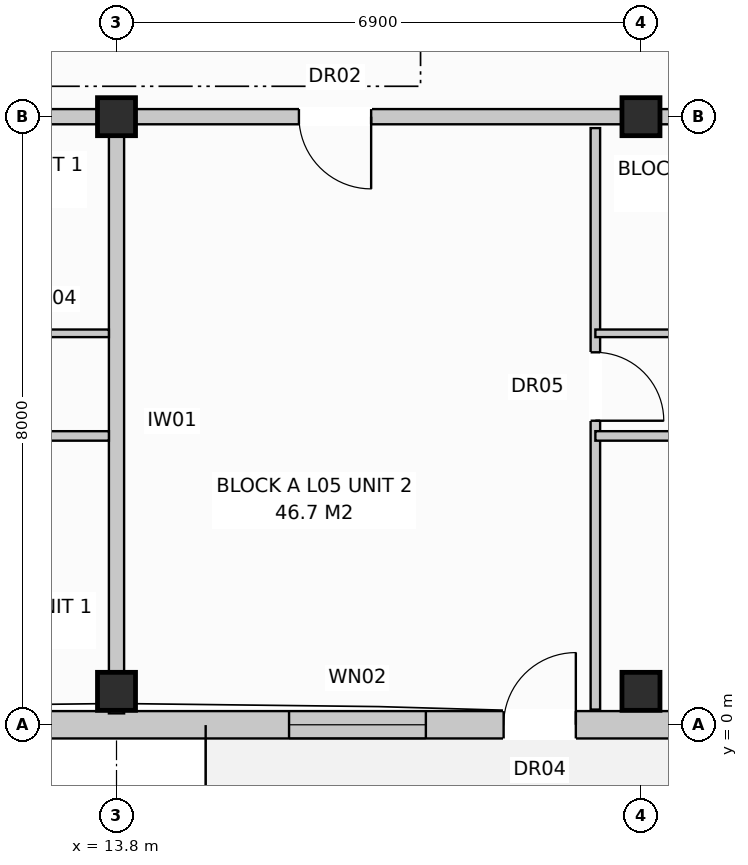
"""IFC4 building model, lengths in metres.
Left out: names, types, materials, properties, quantities, classifications, styles, units other than length and angle.
Written with IfcOpenShell. Run it as: python <this file> out.ifc"""

import sys

from ifc_helpers import new_model, si_unit, direction, frame, frame_2d, origin, origin_with_axes, origin_2d, place, context, subcontext, project, spatial, rectangle, extrude, element, fill, save


model = new_model("IFC4")
c1 = context("Model", 3, precision=1e-05, world=origin(), true_north=direction((0.0, 1.0)))
c2 = subcontext(c1, "Body", "Model", "MODEL_VIEW")
j1 = project(units=[si_unit("LENGTHUNIT", "METRE"), si_unit("PLANEANGLEUNIT", "RADIAN")], contexts=[c1])
p1 = place(None, origin())
s1 = spatial("IfcSite", under=j1, at=p1, CompositionType="ELEMENT")
p2 = place(p1, origin())
s2 = spatial("IfcBuilding", under=s1, at=p2, CompositionType="ELEMENT")
p3 = place(p2, frame((0.0, 0.0, 17.6)))
s3 = spatial("IfcBuildingStorey", under=s2, at=p3, CompositionType="ELEMENT", Elevation=17.6)
for number, where, z_axis, x_axis in (
    (1, (13.8, 0.44, 0.0), (0.0, 0.0, 1.0), (1.0, 0.0, 0.0)),
    (2, (13.8, 8.0, 0.0), (0.0, 0.0, 1.0), (1.0, 0.0, 0.0)),
    (3, (20.7, 0.44, 0.0), (0.0, 0.0, 1.0), (1.0, 0.0, 0.0)),
    (4, (20.7, 8.0, 0.0), (0.0, 0.0, 1.0), (1.0, 0.0, 0.0)),
):
    element("IfcColumn", number, at=place(p3, frame(where, z_axis=z_axis, x_axis=x_axis)), inside=s3, PredefinedType="COLUMN", context=c2, shape_type="SweptSolid", body=[
        extrude(rectangle(XDim=0.5, YDim=0.5, at=origin_2d()), origin(), (0.0, 0.0, 1.0), 3.2),
    ])
p4 = place(p3, frame((0.17, 0.0, 0.0), z_axis=(0.0, 0.0, 1.0), x_axis=(1.0, 0.0, 0.0)))
e5 = element("IfcWall", 5, at=p4, inside=s3, PredefinedType="STANDARD", context=c2, shape_type="SweptSolid", body=[
    extrude(rectangle(XDim=54.86, YDim=0.36, at=frame_2d((27.43, 0.0))), origin(), (0.0, 0.0, 1.0), 2.95),
])
p5 = place(p4, frame((3.823, 0.0, 0.0)))
e6 = element("IfcOpeningElement", 6, at=p5, cuts=e5, PredefinedType="OPENING", context=c2, shape_type="SweptSolid", body=[
    extrude(rectangle(XDim=0.95, YDim=2.1, at=frame_2d((0.475, 1.05))), frame((0.0, 0.192, 0.0), z_axis=(0.0, -1.0, 0.0), x_axis=(1.0, 0.0, 0.0)), (0.0, 0.0, 1.0), 0.384),
])
p6 = place(p4, frame((18.723, 0.0, 0.0)))
e7 = element("IfcOpeningElement", 7, at=p6, cuts=e5, PredefinedType="OPENING", context=c2, shape_type="SweptSolid", body=[
    extrude(rectangle(XDim=0.95, YDim=2.1, at=frame_2d((0.475, 1.05))), frame((0.0, 0.192, 0.0), z_axis=(0.0, -1.0, 0.0), x_axis=(1.0, 0.0, 0.0)), (0.0, 0.0, 1.0), 0.384),
])
p7 = place(p4, frame((29.123, 0.0, 0.0)))
e8 = element("IfcOpeningElement", 8, at=p7, cuts=e5, PredefinedType="OPENING", context=c2, shape_type="SweptSolid", body=[
    extrude(rectangle(XDim=0.95, YDim=2.1, at=frame_2d((0.475, 1.05))), frame((0.0, 0.192, 0.0), z_axis=(0.0, -1.0, 0.0), x_axis=(1.0, 0.0, 0.0)), (0.0, 0.0, 1.0), 0.384),
])
p8 = place(p4, frame((46.5, 0.0, 0.0)))
e9 = element("IfcOpeningElement", 9, at=p8, cuts=e5, PredefinedType="OPENING", context=c2, shape_type="SweptSolid", body=[
    extrude(rectangle(XDim=0.95, YDim=2.1, at=frame_2d((0.475, 1.05))), frame((0.0, 0.192, 0.0), z_axis=(0.0, -1.0, 0.0), x_axis=(1.0, 0.0, 0.0)), (0.0, 0.0, 1.0), 0.384),
])
p9 = place(p4, frame((1.6, 0.0, 0.8)))
e10 = element("IfcOpeningElement", 10, at=p9, cuts=e5, PredefinedType="OPENING", context=c2, shape_type="SweptSolid", body=[
    extrude(rectangle(XDim=1.8, YDim=1.7, at=frame_2d((0.9, 0.85))), frame((0.0, 0.192, 0.0), z_axis=(0.0, -1.0, 0.0), x_axis=(1.0, 0.0, 0.0)), (0.0, 0.0, 1.0), 0.384),
])
p10 = place(p4, frame((7.232, 0.0, 0.72)))
e11 = element("IfcOpeningElement", 11, at=p10, cuts=e5, PredefinedType="OPENING", context=c2, shape_type="SweptSolid", body=[
    extrude(rectangle(XDim=1.9, YDim=1.85, at=frame_2d((0.95, 0.925))), frame((0.0, 0.192, 0.0), z_axis=(0.0, -1.0, 0.0), x_axis=(1.0, 0.0, 0.0)), (0.0, 0.0, 1.0), 0.384),
])
p11 = place(p4, frame((10.425, 0.0, 0.8)))
e12 = element("IfcOpeningElement", 12, at=p11, cuts=e5, PredefinedType="OPENING", context=c2, shape_type="SweptSolid", body=[
    extrude(rectangle(XDim=1.95, YDim=1.65, at=frame_2d((0.975, 0.825))), frame((0.0, 0.192, 0.0), z_axis=(0.0, -1.0, 0.0), x_axis=(1.0, 0.0, 0.0)), (0.0, 0.0, 1.0), 0.384),
])
p12 = place(p4, frame((15.9, 0.0, 0.8)))
e13 = element("IfcOpeningElement", 13, at=p12, cuts=e5, PredefinedType="OPENING", context=c2, shape_type="SweptSolid", body=[
    extrude(rectangle(XDim=1.8, YDim=1.7, at=frame_2d((0.9, 0.85))), frame((0.0, 0.192, 0.0), z_axis=(0.0, -1.0, 0.0), x_axis=(1.0, 0.0, 0.0)), (0.0, 0.0, 1.0), 0.384),
])
p13 = place(p4, frame((21.55, 0.0, 0.72)))
e14 = element("IfcOpeningElement", 14, at=p13, cuts=e5, PredefinedType="OPENING", context=c2, shape_type="SweptSolid", body=[
    extrude(rectangle(XDim=1.9, YDim=1.85, at=frame_2d((0.95, 0.925))), frame((0.0, 0.192, 0.0), z_axis=(0.0, -1.0, 0.0), x_axis=(1.0, 0.0, 0.0)), (0.0, 0.0, 1.0), 0.384),
])
p14 = place(p4, frame((25.6, 0.0, 0.72)))
e15 = element("IfcOpeningElement", 15, at=p14, cuts=e5, PredefinedType="OPENING", context=c2, shape_type="SweptSolid", body=[
    extrude(rectangle(XDim=1.1, YDim=1.5, at=frame_2d((0.55, 0.75))), frame((0.0, 0.192, 0.0), z_axis=(0.0, -1.0, 0.0), x_axis=(1.0, 0.0, 0.0)), (0.0, 0.0, 1.0), 0.384),
])
p15 = place(p4, frame((31.4, 0.0, 0.8)))
e16 = element("IfcOpeningElement", 16, at=p15, cuts=e5, PredefinedType="OPENING", context=c2, shape_type="SweptSolid", body=[
    extrude(rectangle(XDim=1.8, YDim=1.7, at=frame_2d((0.9, 0.85))), frame((0.0, 0.192, 0.0), z_axis=(0.0, -1.0, 0.0), x_axis=(1.0, 0.0, 0.0)), (0.0, 0.0, 1.0), 0.384),
])
p16 = place(p4, frame((35.55, 0.0, 0.72)))
e17 = element("IfcOpeningElement", 17, at=p16, cuts=e5, PredefinedType="OPENING", context=c2, shape_type="SweptSolid", body=[
    extrude(rectangle(XDim=1.9, YDim=1.85, at=frame_2d((0.95, 0.925))), frame((0.0, 0.192, 0.0), z_axis=(0.0, -1.0, 0.0), x_axis=(1.0, 0.0, 0.0)), (0.0, 0.0, 1.0), 0.384),
])
p17 = place(p4, frame((39.25, 0.0, 0.72)))
e18 = element("IfcOpeningElement", 18, at=p17, cuts=e5, PredefinedType="OPENING", context=c2, shape_type="SweptSolid", body=[
    extrude(rectangle(XDim=1.1, YDim=1.5, at=frame_2d((0.55, 0.75))), frame((0.0, 0.192, 0.0), z_axis=(0.0, -1.0, 0.0), x_axis=(1.0, 0.0, 0.0)), (0.0, 0.0, 1.0), 0.384),
])
p18 = place(p4, frame((44.4, 0.0, 0.8)))
e19 = element("IfcOpeningElement", 19, at=p18, cuts=e5, PredefinedType="OPENING", context=c2, shape_type="SweptSolid", body=[
    extrude(rectangle(XDim=1.8, YDim=1.7, at=frame_2d((0.9, 0.85))), frame((0.0, 0.192, 0.0), z_axis=(0.0, -1.0, 0.0), x_axis=(1.0, 0.0, 0.0)), (0.0, 0.0, 1.0), 0.384),
])
p19 = place(p4, frame((49.15, 0.0, 0.72)))
e20 = element("IfcOpeningElement", 20, at=p19, cuts=e5, PredefinedType="OPENING", context=c2, shape_type="SweptSolid", body=[
    extrude(rectangle(XDim=1.9, YDim=1.85, at=frame_2d((0.95, 0.925))), frame((0.0, 0.192, 0.0), z_axis=(0.0, -1.0, 0.0), x_axis=(1.0, 0.0, 0.0)), (0.0, 0.0, 1.0), 0.384),
])
p20 = place(p4, frame((52.95, 0.0, 0.72)))
e21 = element("IfcOpeningElement", 21, at=p20, cuts=e5, PredefinedType="OPENING", context=c2, shape_type="SweptSolid", body=[
    extrude(rectangle(XDim=1.1, YDim=1.5, at=frame_2d((0.55, 0.75))), frame((0.0, 0.192, 0.0), z_axis=(0.0, -1.0, 0.0), x_axis=(1.0, 0.0, 0.0)), (0.0, 0.0, 1.0), 0.384),
])
p21 = place(p3, frame((13.8, 7.85, 0.0), z_axis=(0.0, 0.0, 1.0), x_axis=(0.0, -1.0, 0.0)))
e22 = element("IfcWall", 22, at=p21, inside=s3, PredefinedType="PARTITIONING", context=c2, shape_type="SweptSolid", body=[
    extrude(rectangle(XDim=7.7, YDim=0.2, at=frame_2d((3.85, 0.0))), origin(), (0.0, 0.0, 1.0), 2.95),
])
p22 = place(p3, frame((0.0, 8.0, 0.0), z_axis=(0.0, 0.0, 1.0), x_axis=(1.0, 0.0, 0.0)))
e23 = element("IfcWall", 23, at=p22, inside=s3, PredefinedType="PARTITIONING", context=c2, shape_type="SweptSolid", body=[
    extrude(rectangle(XDim=13.8, YDim=0.2, at=frame_2d((6.9, 0.0))), origin(), (0.0, 0.0, 1.0), 2.39),
])
p23 = place(p22, frame((2.4, 0.0, 0.0)))
e24 = element("IfcOpeningElement", 24, at=p23, cuts=e23, PredefinedType="OPENING", context=c2, shape_type="SweptSolid", body=[
    extrude(rectangle(XDim=0.95, YDim=2.15, at=frame_2d((0.475, 1.075))), frame((0.0, 0.112, 0.0), z_axis=(0.0, -1.0, 0.0), x_axis=(1.0, 0.0, 0.0)), (0.0, 0.0, 1.0), 0.224),
])
p24 = place(p3, frame((5.2, 5.15, 0.0), z_axis=(0.0, 0.0, 1.0), x_axis=(1.0, 0.0, 0.0)))
e25 = element("IfcWall", 25, at=p24, inside=s3, PredefinedType="PARTITIONING", context=c2, shape_type="SweptSolid", body=[
    extrude(rectangle(XDim=8.5, YDim=0.1, at=frame_2d((4.25, 0.0))), origin(), (0.0, 0.0, 1.0), 2.95),
])
p25 = place(p24, frame((1.0, 0.0, 0.0)))
e26 = element("IfcOpeningElement", 26, at=p25, cuts=e25, PredefinedType="OPENING", context=c2, shape_type="SweptSolid", body=[
    extrude(rectangle(XDim=0.85, YDim=2.1, at=frame_2d((0.425, 1.05))), frame((0.0, 0.062, 0.0), z_axis=(0.0, -1.0, 0.0), x_axis=(1.0, 0.0, 0.0)), (0.0, 0.0, 1.0), 0.124),
])
p26 = place(p24, frame((3.4, 0.0, 0.0)))
e27 = element("IfcOpeningElement", 27, at=p26, cuts=e25, PredefinedType="OPENING", context=c2, shape_type="SweptSolid", body=[
    extrude(rectangle(XDim=0.85, YDim=2.05, at=frame_2d((0.425, 1.025))), frame((0.0, 0.062, 0.0), z_axis=(0.0, -1.0, 0.0), x_axis=(1.0, 0.0, 0.0)), (0.0, 0.0, 1.0), 0.124),
])
p27 = place(p24, frame((6.2, 0.0, 0.0)))
e28 = element("IfcOpeningElement", 28, at=p27, cuts=e25, PredefinedType="OPENING", context=c2, shape_type="SweptSolid", body=[
    extrude(rectangle(XDim=0.85, YDim=2.05, at=frame_2d((0.425, 1.025))), frame((0.0, 0.062, 0.0), z_axis=(0.0, -1.0, 0.0), x_axis=(1.0, 0.0, 0.0)), (0.0, 0.0, 1.0), 0.124),
])
p28 = place(p3, frame((5.2, 3.8, 0.0), z_axis=(0.0, 0.0, 1.0), x_axis=(1.0, 0.0, 0.0)))
e29 = element("IfcWall", 29, at=p28, inside=s3, PredefinedType="PARTITIONING", context=c2, shape_type="SweptSolid", body=[
    extrude(rectangle(XDim=8.5, YDim=0.125, at=frame_2d((4.25, 0.0))), origin(), (0.0, 0.0, 1.0), 2.95),
])
p29 = place(p28, frame((1.5, 0.0, 0.0)))
e30 = element("IfcOpeningElement", 30, at=p29, cuts=e29, PredefinedType="OPENING", context=c2, shape_type="SweptSolid", body=[
    extrude(rectangle(XDim=0.9, YDim=2.1, at=frame_2d((0.45, 1.05))), frame((0.0, 0.074, 0.0), z_axis=(0.0, -1.0, 0.0), x_axis=(1.0, 0.0, 0.0)), (0.0, 0.0, 1.0), 0.149),
])
p30 = place(p28, frame((5.6, 0.0, 0.0)))
e31 = element("IfcOpeningElement", 31, at=p30, cuts=e29, PredefinedType="OPENING", context=c2, shape_type="SweptSolid", body=[
    extrude(rectangle(XDim=0.9, YDim=2.1, at=frame_2d((0.45, 1.05))), frame((0.0, 0.074, 0.0), z_axis=(0.0, -1.0, 0.0), x_axis=(1.0, 0.0, 0.0)), (0.0, 0.0, 1.0), 0.149),
])
p31 = place(p3, frame((13.8, 8.0, 0.0), z_axis=(0.0, 0.0, 1.0), x_axis=(1.0, 0.0, 0.0)))
e32 = element("IfcWall", 32, at=p31, inside=s3, PredefinedType="PARTITIONING", context=c2, shape_type="SweptSolid", body=[
    extrude(rectangle(XDim=20.7, YDim=0.2, at=frame_2d((10.35, 0.0))), origin(), (0.0, 0.0, 1.0), 2.39),
])
p32 = place(p31, frame((2.4, 0.0, 0.0)))
e33 = element("IfcOpeningElement", 33, at=p32, cuts=e32, PredefinedType="OPENING", context=c2, shape_type="SweptSolid", body=[
    extrude(rectangle(XDim=0.95, YDim=2.15, at=frame_2d((0.475, 1.075))), frame((0.0, 0.112, 0.0), z_axis=(0.0, -1.0, 0.0), x_axis=(1.0, 0.0, 0.0)), (0.0, 0.0, 1.0), 0.224),
])
p33 = place(p3, frame((20.1, 7.85, 0.0), z_axis=(0.0, 0.0, 1.0), x_axis=(0.0, -1.0, 0.0)))
e34 = element("IfcWall", 34, at=p33, inside=s3, PredefinedType="PARTITIONING", context=c2, shape_type="SweptSolid", body=[
    extrude(rectangle(XDim=7.65, YDim=0.125, at=frame_2d((3.825, 0.0))), origin(), (0.0, 0.0, 1.0), 2.95),
])
p34 = place(p33, frame((2.95, 0.0, 0.0)))
e35 = element("IfcOpeningElement", 35, at=p34, cuts=e34, PredefinedType="OPENING", context=c2, shape_type="SweptSolid", body=[
    extrude(rectangle(XDim=0.9, YDim=2.1, at=frame_2d((0.45, 1.05))), frame((0.0, 0.074, 0.0), z_axis=(0.0, -1.0, 0.0), x_axis=(1.0, 0.0, 0.0)), (0.0, 0.0, 1.0), 0.149),
])
p35 = place(p3, frame((20.1, 5.15, 0.0), z_axis=(0.0, 0.0, 1.0), x_axis=(1.0, 0.0, 0.0)))
e36 = element("IfcWall", 36, at=p35, inside=s3, PredefinedType="PARTITIONING", context=c2, shape_type="SweptSolid", body=[
    extrude(rectangle(XDim=14.3, YDim=0.1, at=frame_2d((7.15, 0.0))), origin(), (0.0, 0.0, 1.0), 2.95),
])
p36 = place(p35, frame((1.6, 0.0, 0.0)))
e37 = element("IfcOpeningElement", 37, at=p36, cuts=e36, PredefinedType="OPENING", context=c2, shape_type="SweptSolid", body=[
    extrude(rectangle(XDim=0.9, YDim=2.1, at=frame_2d((0.45, 1.05))), frame((0.0, 0.062, 0.0), z_axis=(0.0, -1.0, 0.0), x_axis=(1.0, 0.0, 0.0)), (0.0, 0.0, 1.0), 0.124),
])
p37 = place(p35, frame((5.1, 0.0, 0.0)))
e38 = element("IfcOpeningElement", 38, at=p37, cuts=e36, PredefinedType="OPENING", context=c2, shape_type="SweptSolid", body=[
    extrude(rectangle(XDim=0.85, YDim=2.05, at=frame_2d((0.425, 1.025))), frame((0.0, 0.062, 0.0), z_axis=(0.0, -1.0, 0.0), x_axis=(1.0, 0.0, 0.0)), (0.0, 0.0, 1.0), 0.124),
])
p38 = place(p35, frame((8.2, 0.0, 0.0)))
e39 = element("IfcOpeningElement", 39, at=p38, cuts=e36, PredefinedType="OPENING", context=c2, shape_type="SweptSolid", body=[
    extrude(rectangle(XDim=0.85, YDim=2.05, at=frame_2d((0.425, 1.025))), frame((0.0, 0.062, 0.0), z_axis=(0.0, -1.0, 0.0), x_axis=(1.0, 0.0, 0.0)), (0.0, 0.0, 1.0), 0.124),
])
p39 = place(p35, frame((11.6, 0.0, 0.0)))
e40 = element("IfcOpeningElement", 40, at=p39, cuts=e36, PredefinedType="OPENING", context=c2, shape_type="SweptSolid", body=[
    extrude(rectangle(XDim=0.85, YDim=2.05, at=frame_2d((0.425, 1.025))), frame((0.0, 0.062, 0.0), z_axis=(0.0, -1.0, 0.0), x_axis=(1.0, 0.0, 0.0)), (0.0, 0.0, 1.0), 0.124),
])
p40 = place(p3, frame((20.1, 3.8, 0.0), z_axis=(0.0, 0.0, 1.0), x_axis=(1.0, 0.0, 0.0)))
e41 = element("IfcWall", 41, at=p40, inside=s3, PredefinedType="PARTITIONING", context=c2, shape_type="SweptSolid", body=[
    extrude(rectangle(XDim=10.4, YDim=0.125, at=frame_2d((5.2, 0.0))), origin(), (0.0, 0.0, 1.0), 2.95),
])
p41 = place(p40, frame((2.0, 0.0, 0.0)))
e42 = element("IfcOpeningElement", 42, at=p41, cuts=e41, PredefinedType="OPENING", context=c2, shape_type="SweptSolid", body=[
    extrude(rectangle(XDim=0.9, YDim=2.1, at=frame_2d((0.45, 1.05))), frame((0.0, 0.074, 0.0), z_axis=(0.0, -1.0, 0.0), x_axis=(1.0, 0.0, 0.0)), (0.0, 0.0, 1.0), 0.149),
])
p42 = place(p40, frame((7.2, 0.0, 0.0)))
e43 = element("IfcOpeningElement", 43, at=p42, cuts=e41, PredefinedType="OPENING", context=c2, shape_type="SweptSolid", body=[
    extrude(rectangle(XDim=0.9, YDim=2.1, at=frame_2d((0.45, 1.05))), frame((0.0, 0.074, 0.0), z_axis=(0.0, -1.0, 0.0), x_axis=(1.0, 0.0, 0.0)), (0.0, 0.0, 1.0), 0.149),
])
p43 = place(p6, origin_with_axes())
e44 = element("IfcDoor", 44, at=p43, inside=s3, OperationType="SINGLE_SWING_RIGHT", PredefinedType="DOOR", context=c2, shape_type="SweptSolid", body=[
    extrude(rectangle(XDim=0.95, YDim=2.1, at=frame_2d((0.475, 1.05))), frame((0.0, 0.025, 0.0), z_axis=(0.0, -1.0, 0.0), x_axis=(1.0, 0.0, 0.0)), (0.0, 0.0, 1.0), 0.05),
])
fill(e7, e44)
p44 = place(p12, origin_with_axes())
e45 = element("IfcWindow", 45, at=p44, inside=s3, PartitioningType="SINGLE_PANEL", PredefinedType="WINDOW", context=c2, shape_type="SweptSolid", body=[
    extrude(rectangle(XDim=1.8, YDim=1.7, at=frame_2d((0.9, 0.85))), frame((0.0, 0.03, 0.0), z_axis=(0.0, -1.0, 0.0), x_axis=(1.0, 0.0, 0.0)), (0.0, 0.0, 1.0), 0.06),
])
fill(e13, e45)
p45 = place(p32, frame((0.95, 0.0, 0.0), z_axis=(0.0, 0.0, 1.0), x_axis=(-1.0, 0.0, 0.0)))
e46 = element("IfcDoor", 46, at=p45, inside=s3, OperationType="SINGLE_SWING_RIGHT", PredefinedType="DOOR", context=c2, shape_type="SweptSolid", body=[
    extrude(rectangle(XDim=0.95, YDim=2.15, at=frame_2d((0.475, 1.075))), frame((0.0, 0.025, 0.0), z_axis=(0.0, -1.0, 0.0), x_axis=(1.0, 0.0, 0.0)), (0.0, 0.0, 1.0), 0.05),
])
fill(e33, e46)
p46 = place(p34, origin_with_axes())
e47 = element("IfcDoor", 47, at=p46, inside=s3, OperationType="SINGLE_SWING_RIGHT", PredefinedType="DOOR", context=c2, shape_type="SweptSolid", body=[
    extrude(rectangle(XDim=0.9, YDim=2.1, at=frame_2d((0.45, 1.05))), frame((0.0, 0.025, 0.0), z_axis=(0.0, -1.0, 0.0), x_axis=(1.0, 0.0, 0.0)), (0.0, 0.0, 1.0), 0.05),
])
fill(e35, e47)
save(model, sys.argv[1])
